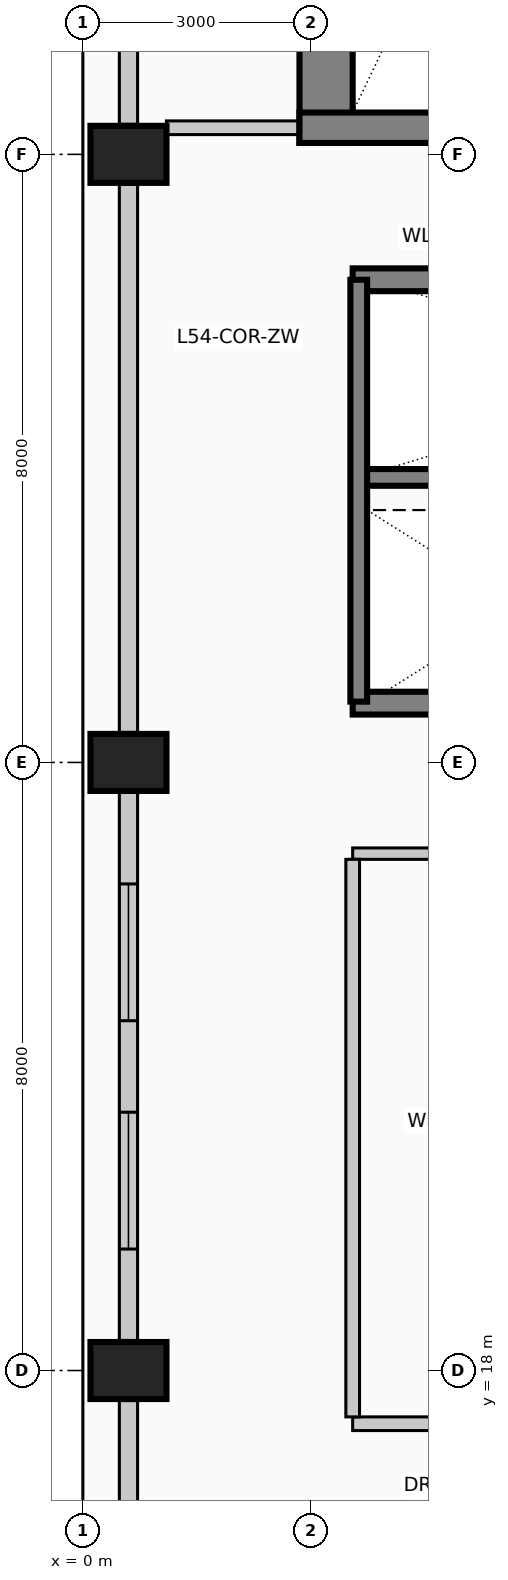
"""IFC4 building model, lengths in metres.
Left out: names, types, materials, properties, quantities, classifications, styles, units other than length and angle.
Written with IfcOpenShell. Run it as: python <this file> out.ifc"""

import sys

from ifc_helpers import new_model, si_unit, direction, frame, frame_2d, origin, origin_2d, place, context, subcontext, project, spatial, rectangle, extrude, element, fill, save


model = new_model("IFC4")
c1 = context("Model", 3, precision=1e-05, world=origin(), true_north=direction((0.0, 1.0)))
c2 = subcontext(c1, "Body", "Model", "MODEL_VIEW")
j1 = project(units=[si_unit("LENGTHUNIT", "METRE"), si_unit("PLANEANGLEUNIT", "RADIAN")], contexts=[c1])
p1 = place(None, origin())
s1 = spatial("IfcSite", under=j1, at=p1, CompositionType="ELEMENT")
p2 = place(p1, origin())
s2 = spatial("IfcBuilding", under=s1, at=p2, CompositionType="ELEMENT")
p3 = place(p2, frame((0.0, 0.0, 222.6)))
s3 = spatial("IfcBuildingStorey", under=s2, at=p3, CompositionType="ELEMENT", Elevation=222.6)
p4 = place(p3, frame((3.2, 34.15, 0.0), z_axis=(0.0, 0.0, 1.0), x_axis=(0.0, 1.0, 0.0)))
e1 = element("IfcWall", 1, at=p4, inside=s3, PredefinedType="SHEAR", context=c2, shape_type="SweptSolid", body=[
    extrude(rectangle(XDim=8.98, YDim=0.7, at=frame_2d((4.49, 0.0))), origin(), (0.0, 0.0, 1.0), 4.0),
])
p5 = place(p3, frame((2.85, 34.35, 0.0), z_axis=(0.0, 0.0, 1.0), x_axis=(1.0, 0.0, 0.0)))
e2 = element("IfcWall", 2, at=p5, inside=s3, PredefinedType="SHEAR", context=c2, shape_type="SweptSolid", body=[
    extrude(rectangle(XDim=4.86, YDim=0.4, at=frame_2d((2.43, 0.0))), origin(), (0.0, 0.0, 1.0), 4.0),
])
p6 = place(p5, frame((2.4, 0.0, 0.0)))
e3 = element("IfcOpeningElement", 3, at=p6, cuts=e2, PredefinedType="OPENING", context=c2, shape_type="SweptSolid", body=[
    extrude(rectangle(XDim=1.15, YDim=2.2, at=frame_2d((0.575, 1.1))), frame((0.0, 0.21, 0.0), z_axis=(0.0, -1.0, 0.0), x_axis=(1.0, 0.0, 0.0)), (0.0, 0.0, 1.0), 0.42),
])
for number, where, z_axis, x_axis in (
    (4, (0.6, 18.0, 0.0), (0.0, 0.0, 1.0), (0.0, 1.0, 0.0)),
    (5, (0.6, 26.0, 0.0), (0.0, 0.0, 1.0), (0.0, 1.0, 0.0)),
    (6, (0.6, 34.0, 0.0), (0.0, 0.0, 1.0), (0.0, 1.0, 0.0)),
):
    element("IfcColumn", number, at=place(p3, frame(where, z_axis=z_axis, x_axis=x_axis)), inside=s3, PredefinedType="COLUMN", context=c2, shape_type="SweptSolid", body=[
        extrude(rectangle(XDim=0.75, YDim=1.0, at=origin_2d()), origin(), (0.0, 0.0, 1.0), 4.0),
    ])
p7 = place(p3, frame((0.6, 10.395, 0.0), z_axis=(0.0, 0.0, 1.0), x_axis=(0.0, 1.0, 0.0)))
e7 = element("IfcWall", 7, at=p7, inside=s3, PredefinedType="SOLIDWALL", context=c2, shape_type="SweptSolid", body=[
    extrude(rectangle(XDim=7.21, YDim=0.24, at=frame_2d((3.605, 0.0))), origin(), (0.0, 0.0, 1.0), 3.0),
])
p8 = place(p7, frame((1.203, 0.0, 0.42)))
e8 = element("IfcOpeningElement", 8, at=p8, cuts=e7, PredefinedType="OPENING", context=c2, shape_type="SweptSolid", body=[
    extrude(rectangle(XDim=1.8, YDim=2.2, at=frame_2d((0.9, 1.1))), frame((0.0, 0.13, 0.0), z_axis=(0.0, -1.0, 0.0), x_axis=(1.0, 0.0, 0.0)), (0.0, 0.0, 1.0), 0.26),
])
p9 = place(p3, frame((0.6, 18.395, 0.0), z_axis=(0.0, 0.0, 1.0), x_axis=(0.0, 1.0, 0.0)))
e9 = element("IfcWall", 9, at=p9, inside=s3, PredefinedType="SOLIDWALL", context=c2, shape_type="SweptSolid", body=[
    extrude(rectangle(XDim=7.21, YDim=0.24, at=frame_2d((3.605, 0.0))), origin(), (0.0, 0.0, 1.0), 3.0),
])
p10 = place(p9, frame((1.203, 0.0, 0.42)))
e10 = element("IfcOpeningElement", 10, at=p10, cuts=e9, PredefinedType="OPENING", context=c2, shape_type="SweptSolid", body=[
    extrude(rectangle(XDim=1.8, YDim=2.2, at=frame_2d((0.9, 1.1))), frame((0.0, 0.13, 0.0), z_axis=(0.0, -1.0, 0.0), x_axis=(1.0, 0.0, 0.0)), (0.0, 0.0, 1.0), 0.26),
])
p11 = place(p9, frame((4.207, 0.0, 0.42)))
e11 = element("IfcOpeningElement", 11, at=p11, cuts=e9, PredefinedType="OPENING", context=c2, shape_type="SweptSolid", body=[
    extrude(rectangle(XDim=1.8, YDim=2.2, at=frame_2d((0.9, 1.1))), frame((0.0, 0.13, 0.0), z_axis=(0.0, -1.0, 0.0), x_axis=(1.0, 0.0, 0.0)), (0.0, 0.0, 1.0), 0.26),
])
p12 = place(p3, frame((0.6, 26.395, 0.0), z_axis=(0.0, 0.0, 1.0), x_axis=(0.0, 1.0, 0.0)))
e12 = element("IfcWall", 12, at=p12, inside=s3, PredefinedType="SOLIDWALL", context=c2, shape_type="SweptSolid", body=[
    extrude(rectangle(XDim=7.21, YDim=0.24, at=frame_2d((3.605, 0.0))), origin(), (0.0, 0.0, 1.0), 3.0),
])
p13 = place(p3, frame((0.6, 34.395, 0.0), z_axis=(0.0, 0.0, 1.0), x_axis=(0.0, 1.0, 0.0)))
e13 = element("IfcWall", 13, at=p13, inside=s3, PredefinedType="SOLIDWALL", context=c2, shape_type="SweptSolid", body=[
    extrude(rectangle(XDim=7.61, YDim=0.24, at=frame_2d((3.805, 0.0))), origin(), (0.0, 0.0, 1.0), 3.0),
])
for number, where, z_axis, x_axis in (
    (14, (3.55, 32.35, 0.0), (0.0, 0.0, 1.0), (1.0, 0.0, 0.0)),
    (15, (5.65, 26.78, 0.0), (0.0, 0.0, 1.0), (-1.0, 0.0, 0.0)),
):
    element("IfcWall", number, at=place(p3, frame(where, z_axis=z_axis, x_axis=x_axis)), inside=s3, PredefinedType="SOLIDWALL", context=c2, shape_type="SweptSolid", body=[
        extrude(rectangle(XDim=2.1, YDim=0.3, at=frame_2d((1.05, 0.0))), origin(), (0.0, 0.0, 1.0), 4.0),
    ])
p14 = place(p3, frame((3.55, 29.75, 0.0), z_axis=(0.0, 0.0, 1.0), x_axis=(1.0, 0.0, 0.0)))
e16 = element("IfcWall", 16, at=p14, inside=s3, PredefinedType="SOLIDWALL", context=c2, shape_type="SweptSolid", body=[
    extrude(rectangle(XDim=8.65, YDim=0.22, at=frame_2d((4.325, 0.0))), origin(), (0.0, 0.0, 1.0), 4.0),
])
p15 = place(p3, frame((3.63, 26.8, 0.0), z_axis=(0.0, 0.0, 1.0), x_axis=(0.0, 1.0, 0.0)))
e17 = element("IfcWall", 17, at=p15, inside=s3, PredefinedType="SOLIDWALL", context=c2, shape_type="SweptSolid", body=[
    extrude(rectangle(XDim=5.55, YDim=0.22, at=frame_2d((2.775, 0.0))), origin(), (0.0, 0.0, 1.0), 4.0),
])
p16 = place(p3, frame((3.55, 17.3, 0.0), z_axis=(0.0, 0.0, 1.0), x_axis=(1.0, 0.0, 0.0)))
e18 = element("IfcWall", 18, at=p16, inside=s3, PredefinedType="PARTITIONING", context=c2, shape_type="SweptSolid", body=[
    extrude(rectangle(XDim=6.25, YDim=0.18, at=frame_2d((3.125, 0.0))), origin(), (0.0, 0.0, 1.0), 3.75),
])
p17 = place(p16, frame((2.65, 0.0, 0.0)))
e19 = element("IfcOpeningElement", 19, at=p17, cuts=e18, PredefinedType="OPENING", context=c2, shape_type="SweptSolid", body=[
    extrude(rectangle(XDim=0.95, YDim=2.15, at=frame_2d((0.475, 1.075))), frame((0.0, 0.1, 0.0), z_axis=(0.0, -1.0, 0.0), x_axis=(1.0, 0.0, 0.0)), (0.0, 0.0, 1.0), 0.2),
])
p18 = place(p3, frame((3.55, 24.8, 0.0), z_axis=(0.0, 0.0, 1.0), x_axis=(1.0, 0.0, 0.0)))
e20 = element("IfcWall", 20, at=p18, inside=s3, PredefinedType="PARTITIONING", context=c2, shape_type="SweptSolid", body=[
    extrude(rectangle(XDim=6.25, YDim=0.15, at=frame_2d((3.125, 0.0))), origin(), (0.0, 0.0, 1.0), 3.75),
])
p19 = place(p3, frame((1.1, 34.35, 0.0), z_axis=(0.0, 0.0, 1.0), x_axis=(1.0, 0.0, 0.0)))
e21 = element("IfcWall", 21, at=p19, inside=s3, PredefinedType="PARTITIONING", context=c2, shape_type="SweptSolid", body=[
    extrude(rectangle(XDim=1.75, YDim=0.18, at=frame_2d((0.875, 0.0))), origin(), (0.0, 0.0, 1.0), 3.75),
])
p20 = place(p3, frame((3.55, 17.39, 0.0), z_axis=(0.0, 0.0, 1.0), x_axis=(0.0, 1.0, 0.0)))
e22 = element("IfcWall", 22, at=p20, inside=s3, PredefinedType="PARTITIONING", context=c2, shape_type="SweptSolid", body=[
    extrude(rectangle(XDim=7.335, YDim=0.18, at=frame_2d((3.667, 0.0))), origin(), (0.0, 0.0, 1.0), 3.75),
])
p21 = place(p10, origin())
e23 = element("IfcWindow", 23, at=p21, inside=s3, PartitioningType="SINGLE_PANEL", PredefinedType="WINDOW", context=c2, shape_type="SweptSolid", body=[
    extrude(rectangle(XDim=1.8, YDim=2.2, at=frame_2d((0.9, 1.1))), frame((0.0, 0.03, 0.0), z_axis=(0.0, -1.0, 0.0), x_axis=(1.0, 0.0, 0.0)), (0.0, 0.0, 1.0), 0.06),
])
fill(e10, e23)
p22 = place(p11, origin())
e24 = element("IfcWindow", 24, at=p22, inside=s3, PartitioningType="SINGLE_PANEL", PredefinedType="WINDOW", context=c2, shape_type="SweptSolid", body=[
    extrude(rectangle(XDim=1.8, YDim=2.2, at=frame_2d((0.9, 1.1))), frame((0.0, 0.03, 0.0), z_axis=(0.0, -1.0, 0.0), x_axis=(1.0, 0.0, 0.0)), (0.0, 0.0, 1.0), 0.06),
])
fill(e11, e24)
save(model, sys.argv[1])
